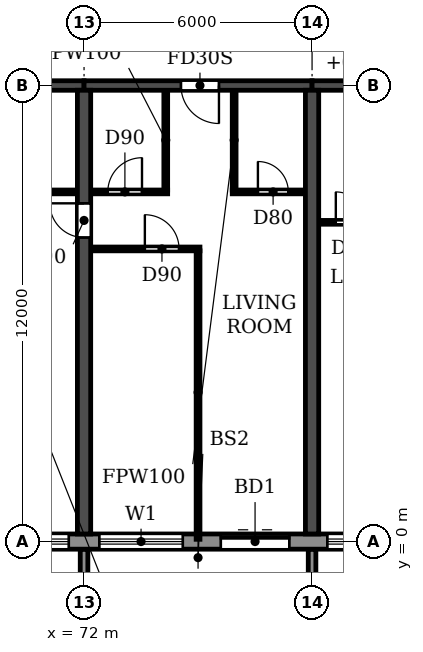
"""IFC4 building model, lengths in metres.
Left out: names, types, materials, properties, quantities, classifications, styles, units other than length and angle.
Written with IfcOpenShell. Run it as: python <this file> out.ifc"""

import sys

from ifc_helpers import new_model, si_unit, direction, frame, frame_2d, origin, place, context, subcontext, project, spatial, polyline, rectangle, outline, extrude, source, transform, mapped, element, fill, save


model = new_model("IFC4")
c1 = context("Model", 3, precision=1e-05, world=origin(), true_north=direction((0.0, 1.0)))
c2 = subcontext(c1, "Body", "Model", "MODEL_VIEW")
j1 = project(units=[si_unit("LENGTHUNIT", "METRE"), si_unit("PLANEANGLEUNIT", "RADIAN")], contexts=[c1])
p1 = place(None, origin())
s1 = spatial("IfcSite", under=j1, at=p1, CompositionType="ELEMENT")
p2 = place(p1, origin())
s2 = spatial("IfcBuilding", under=s1, at=p2, CompositionType="ELEMENT")
p3 = place(p2, frame((0.0, 0.0, 82.8)))
s3 = spatial("IfcBuildingStorey", under=s2, at=p3, CompositionType="ELEMENT", Elevation=82.8)
p4 = place(p3, frame((72.0, 0.2, 0.0), z_axis=(0.0, 0.0, 1.0), x_axis=(0.0, 1.0, 0.0)))
e1 = element("IfcWall", 1, at=p4, inside=s3, PredefinedType="SHEAR", context=c2, shape_type="SweptSolid", body=[
    extrude(rectangle(XDim=11.675, YDim=0.35, at=frame_2d((5.837, 0.0))), origin(), (0.0, 0.0, 1.0), 3.06),
])
p5 = place(p4, frame((7.8, 0.0, 0.0)))
e2 = element("IfcOpeningElement", 2, at=p5, cuts=e1, PredefinedType="OPENING", context=c2, shape_type="SweptSolid", body=[
    extrude(rectangle(XDim=0.9, YDim=2.1, at=frame_2d((0.45, 1.05))), frame((0.0, 0.185, 0.0), z_axis=(0.0, -1.0, 0.0), x_axis=(1.0, 0.0, 0.0)), (0.0, 0.0, 1.0), 0.37),
])
p6 = place(p3, frame((78.0, 0.2, 0.0), z_axis=(0.0, 0.0, 1.0), x_axis=(0.0, 1.0, 0.0)))
e3 = element("IfcWall", 3, at=p6, inside=s3, PredefinedType="SHEAR", context=c2, shape_type="SweptSolid", body=[
    extrude(rectangle(XDim=11.675, YDim=0.35, at=frame_2d((5.837, 0.0))), origin(), (0.0, 0.0, 1.0), 3.06),
])
p7 = place(p3, frame((66.0, 12.0, 0.0), z_axis=(0.0, 0.0, 1.0), x_axis=(1.0, 0.0, 0.0)))
e4 = element("IfcWall", 4, at=p7, inside=s3, PredefinedType="SHEAR", context=c2, shape_type="SweptSolid", body=[
    extrude(rectangle(XDim=6.0, YDim=0.25, at=frame_2d((3.0, 0.0))), origin(), (0.0, 0.0, 1.0), 2.46),
])
p8 = place(p3, frame((72.0, 12.0, 0.0), z_axis=(0.0, 0.0, 1.0), x_axis=(1.0, 0.0, 0.0)))
e5 = element("IfcWall", 5, at=p8, inside=s3, PredefinedType="SHEAR", context=c2, shape_type="SweptSolid", body=[
    extrude(rectangle(XDim=6.0, YDim=0.25, at=frame_2d((3.0, 0.0))), origin(), (0.0, 0.0, 1.0), 2.46),
])
p9 = place(p8, frame((2.55, 0.0, 0.0)))
e6 = element("IfcOpeningElement", 6, at=p9, cuts=e5, PredefinedType="OPENING", context=c2, shape_type="SweptSolid", body=[
    extrude(rectangle(XDim=1.0, YDim=2.1, at=frame_2d((0.5, 1.05))), frame((0.0, 0.135, 0.0), z_axis=(0.0, -1.0, 0.0), x_axis=(1.0, 0.0, 0.0)), (0.0, 0.0, 1.0), 0.27),
])
p10 = place(p3, frame((78.0, 12.0, 0.0), z_axis=(0.0, 0.0, 1.0), x_axis=(1.0, 0.0, 0.0)))
e7 = element("IfcWall", 7, at=p10, inside=s3, PredefinedType="SHEAR", context=c2, shape_type="SweptSolid", body=[
    extrude(rectangle(XDim=6.0, YDim=0.25, at=frame_2d((3.0, 0.0))), origin(), (0.0, 0.0, 1.0), 2.46),
])
p11 = place(p10, frame((2.45, 0.0, 0.0)))
e8 = element("IfcOpeningElement", 8, at=p11, cuts=e7, PredefinedType="OPENING", context=c2, shape_type="SweptSolid", body=[
    extrude(rectangle(XDim=1.0, YDim=2.1, at=frame_2d((0.5, 1.05))), frame((0.0, 0.135, 0.0), z_axis=(0.0, -1.0, 0.0), x_axis=(1.0, 0.0, 0.0)), (0.0, 0.0, 1.0), 0.27),
])
p12 = place(p3, frame((10.683, 0.0, 0.0), z_axis=(0.0, 0.0, 1.0), x_axis=(1.0, 0.0, 0.0)))
e9 = element("IfcWall", 9, at=p12, inside=s3, PredefinedType="STANDARD", context=c2, shape_type="SweptSolid", body=[
    extrude(rectangle(XDim=80.634, YDim=0.4, at=frame_2d((40.317, 0.0))), origin(), (0.0, 0.0, 1.0), 3.06),
])
p13 = place(p12, frame((1.717, 0.0, 0.9)))
e10 = element("IfcOpeningElement", 10, at=p13, cuts=e9, PredefinedType="OPENING", context=c2, shape_type="SweptSolid", body=[
    extrude(rectangle(XDim=2.2, YDim=1.5, at=frame_2d((1.1, 0.75))), frame((0.0, 0.21, 0.0), z_axis=(0.0, -1.0, 0.0), x_axis=(1.0, 0.0, 0.0)), (0.0, 0.0, 1.0), 0.42),
])
p14 = place(p12, frame((4.917, 0.0, 0.0)))
e11 = element("IfcOpeningElement", 11, at=p14, cuts=e9, PredefinedType="OPENING", context=c2, shape_type="SweptSolid", body=[
    extrude(rectangle(XDim=1.8, YDim=2.4, at=frame_2d((0.9, 1.2))), frame((0.0, 0.21, 0.0), z_axis=(0.0, -1.0, 0.0), x_axis=(1.0, 0.0, 0.0)), (0.0, 0.0, 1.0), 0.42),
])
p15 = place(p12, frame((7.717, 0.0, 0.9)))
e12 = element("IfcOpeningElement", 12, at=p15, cuts=e9, PredefinedType="OPENING", context=c2, shape_type="SweptSolid", body=[
    extrude(rectangle(XDim=2.2, YDim=1.5, at=frame_2d((1.1, 0.75))), frame((0.0, 0.21, 0.0), z_axis=(0.0, -1.0, 0.0), x_axis=(1.0, 0.0, 0.0)), (0.0, 0.0, 1.0), 0.42),
])
p16 = place(p12, frame((10.717, 0.0, 0.9)))
e13 = element("IfcOpeningElement", 13, at=p16, cuts=e9, PredefinedType="OPENING", context=c2, shape_type="SweptSolid", body=[
    extrude(rectangle(XDim=2.2, YDim=1.5, at=frame_2d((1.1, 0.75))), frame((0.0, 0.21, 0.0), z_axis=(0.0, -1.0, 0.0), x_axis=(1.0, 0.0, 0.0)), (0.0, 0.0, 1.0), 0.42),
])
p17 = place(p12, frame((13.917, 0.0, 0.0)))
e14 = element("IfcOpeningElement", 14, at=p17, cuts=e9, PredefinedType="OPENING", context=c2, shape_type="SweptSolid", body=[
    extrude(rectangle(XDim=1.8, YDim=2.4, at=frame_2d((0.9, 1.2))), frame((0.0, 0.21, 0.0), z_axis=(0.0, -1.0, 0.0), x_axis=(1.0, 0.0, 0.0)), (0.0, 0.0, 1.0), 0.42),
])
p18 = place(p12, frame((16.717, 0.0, 0.9)))
e15 = element("IfcOpeningElement", 15, at=p18, cuts=e9, PredefinedType="OPENING", context=c2, shape_type="SweptSolid", body=[
    extrude(rectangle(XDim=2.2, YDim=1.5, at=frame_2d((1.1, 0.75))), frame((0.0, 0.21, 0.0), z_axis=(0.0, -1.0, 0.0), x_axis=(1.0, 0.0, 0.0)), (0.0, 0.0, 1.0), 0.42),
])
p19 = place(p12, frame((19.717, 0.0, 0.9)))
e16 = element("IfcOpeningElement", 16, at=p19, cuts=e9, PredefinedType="OPENING", context=c2, shape_type="SweptSolid", body=[
    extrude(rectangle(XDim=2.2, YDim=1.5, at=frame_2d((1.1, 0.75))), frame((0.0, 0.21, 0.0), z_axis=(0.0, -1.0, 0.0), x_axis=(1.0, 0.0, 0.0)), (0.0, 0.0, 1.0), 0.42),
])
p20 = place(p12, frame((22.717, 0.0, 0.9)))
e17 = element("IfcOpeningElement", 17, at=p20, cuts=e9, PredefinedType="OPENING", context=c2, shape_type="SweptSolid", body=[
    extrude(rectangle(XDim=2.2, YDim=1.5, at=frame_2d((1.1, 0.75))), frame((0.0, 0.21, 0.0), z_axis=(0.0, -1.0, 0.0), x_axis=(1.0, 0.0, 0.0)), (0.0, 0.0, 1.0), 0.42),
])
p21 = place(p12, frame((25.917, 0.0, 0.0)))
e18 = element("IfcOpeningElement", 18, at=p21, cuts=e9, PredefinedType="OPENING", context=c2, shape_type="SweptSolid", body=[
    extrude(rectangle(XDim=1.8, YDim=2.4, at=frame_2d((0.9, 1.2))), frame((0.0, 0.21, 0.0), z_axis=(0.0, -1.0, 0.0), x_axis=(1.0, 0.0, 0.0)), (0.0, 0.0, 1.0), 0.42),
])
p22 = place(p12, frame((28.717, 0.0, 0.9)))
e19 = element("IfcOpeningElement", 19, at=p22, cuts=e9, PredefinedType="OPENING", context=c2, shape_type="SweptSolid", body=[
    extrude(rectangle(XDim=2.2, YDim=1.5, at=frame_2d((1.1, 0.75))), frame((0.0, 0.21, 0.0), z_axis=(0.0, -1.0, 0.0), x_axis=(1.0, 0.0, 0.0)), (0.0, 0.0, 1.0), 0.42),
])
p23 = place(p12, frame((31.717, 0.0, 0.9)))
e20 = element("IfcOpeningElement", 20, at=p23, cuts=e9, PredefinedType="OPENING", context=c2, shape_type="SweptSolid", body=[
    extrude(rectangle(XDim=2.2, YDim=1.5, at=frame_2d((1.1, 0.75))), frame((0.0, 0.21, 0.0), z_axis=(0.0, -1.0, 0.0), x_axis=(1.0, 0.0, 0.0)), (0.0, 0.0, 1.0), 0.42),
])
p24 = place(p12, frame((34.717, 0.0, 0.9)))
e21 = element("IfcOpeningElement", 21, at=p24, cuts=e9, PredefinedType="OPENING", context=c2, shape_type="SweptSolid", body=[
    extrude(rectangle(XDim=2.2, YDim=1.5, at=frame_2d((1.1, 0.75))), frame((0.0, 0.21, 0.0), z_axis=(0.0, -1.0, 0.0), x_axis=(1.0, 0.0, 0.0)), (0.0, 0.0, 1.0), 0.42),
])
p25 = place(p12, frame((37.717, 0.0, 0.9)))
e22 = element("IfcOpeningElement", 22, at=p25, cuts=e9, PredefinedType="OPENING", context=c2, shape_type="SweptSolid", body=[
    extrude(rectangle(XDim=2.2, YDim=1.5, at=frame_2d((1.1, 0.75))), frame((0.0, 0.21, 0.0), z_axis=(0.0, -1.0, 0.0), x_axis=(1.0, 0.0, 0.0)), (0.0, 0.0, 1.0), 0.42),
])
p26 = place(p12, frame((40.917, 0.0, 0.0)))
e23 = element("IfcOpeningElement", 23, at=p26, cuts=e9, PredefinedType="OPENING", context=c2, shape_type="SweptSolid", body=[
    extrude(rectangle(XDim=1.8, YDim=2.4, at=frame_2d((0.9, 1.2))), frame((0.0, 0.21, 0.0), z_axis=(0.0, -1.0, 0.0), x_axis=(1.0, 0.0, 0.0)), (0.0, 0.0, 1.0), 0.42),
])
p27 = place(p12, frame((43.717, 0.0, 0.9)))
e24 = element("IfcOpeningElement", 24, at=p27, cuts=e9, PredefinedType="OPENING", context=c2, shape_type="SweptSolid", body=[
    extrude(rectangle(XDim=2.2, YDim=1.5, at=frame_2d((1.1, 0.75))), frame((0.0, 0.21, 0.0), z_axis=(0.0, -1.0, 0.0), x_axis=(1.0, 0.0, 0.0)), (0.0, 0.0, 1.0), 0.42),
])
p28 = place(p12, frame((46.717, 0.0, 0.9)))
e25 = element("IfcOpeningElement", 25, at=p28, cuts=e9, PredefinedType="OPENING", context=c2, shape_type="SweptSolid", body=[
    extrude(rectangle(XDim=2.2, YDim=1.5, at=frame_2d((1.1, 0.75))), frame((0.0, 0.21, 0.0), z_axis=(0.0, -1.0, 0.0), x_axis=(1.0, 0.0, 0.0)), (0.0, 0.0, 1.0), 0.42),
])
p29 = place(p12, frame((49.717, 0.0, 0.9)))
e26 = element("IfcOpeningElement", 26, at=p29, cuts=e9, PredefinedType="OPENING", context=c2, shape_type="SweptSolid", body=[
    extrude(rectangle(XDim=2.2, YDim=1.5, at=frame_2d((1.1, 0.75))), frame((0.0, 0.21, 0.0), z_axis=(0.0, -1.0, 0.0), x_axis=(1.0, 0.0, 0.0)), (0.0, 0.0, 1.0), 0.42),
])
p30 = place(p12, frame((52.917, 0.0, 0.0)))
e27 = element("IfcOpeningElement", 27, at=p30, cuts=e9, PredefinedType="OPENING", context=c2, shape_type="SweptSolid", body=[
    extrude(rectangle(XDim=1.8, YDim=2.4, at=frame_2d((0.9, 1.2))), frame((0.0, 0.21, 0.0), z_axis=(0.0, -1.0, 0.0), x_axis=(1.0, 0.0, 0.0)), (0.0, 0.0, 1.0), 0.42),
])
p31 = place(p12, frame((55.717, 0.0, 0.9)))
e28 = element("IfcOpeningElement", 28, at=p31, cuts=e9, PredefinedType="OPENING", context=c2, shape_type="SweptSolid", body=[
    extrude(rectangle(XDim=2.2, YDim=1.5, at=frame_2d((1.1, 0.75))), frame((0.0, 0.21, 0.0), z_axis=(0.0, -1.0, 0.0), x_axis=(1.0, 0.0, 0.0)), (0.0, 0.0, 1.0), 0.42),
])
p32 = place(p12, frame((58.717, 0.0, 0.9)))
e29 = element("IfcOpeningElement", 29, at=p32, cuts=e9, PredefinedType="OPENING", context=c2, shape_type="SweptSolid", body=[
    extrude(rectangle(XDim=2.2, YDim=1.5, at=frame_2d((1.1, 0.75))), frame((0.0, 0.21, 0.0), z_axis=(0.0, -1.0, 0.0), x_axis=(1.0, 0.0, 0.0)), (0.0, 0.0, 1.0), 0.42),
])
p33 = place(p12, frame((61.717, 0.0, 0.9)))
e30 = element("IfcOpeningElement", 30, at=p33, cuts=e9, PredefinedType="OPENING", context=c2, shape_type="SweptSolid", body=[
    extrude(rectangle(XDim=2.2, YDim=1.5, at=frame_2d((1.1, 0.75))), frame((0.0, 0.21, 0.0), z_axis=(0.0, -1.0, 0.0), x_axis=(1.0, 0.0, 0.0)), (0.0, 0.0, 1.0), 0.42),
])
p34 = place(p12, frame((64.917, 0.0, 0.0)))
e31 = element("IfcOpeningElement", 31, at=p34, cuts=e9, PredefinedType="OPENING", context=c2, shape_type="SweptSolid", body=[
    extrude(rectangle(XDim=1.8, YDim=2.4, at=frame_2d((0.9, 1.2))), frame((0.0, 0.21, 0.0), z_axis=(0.0, -1.0, 0.0), x_axis=(1.0, 0.0, 0.0)), (0.0, 0.0, 1.0), 0.42),
])
p35 = place(p12, frame((67.717, 0.0, 0.9)))
e32 = element("IfcOpeningElement", 32, at=p35, cuts=e9, PredefinedType="OPENING", context=c2, shape_type="SweptSolid", body=[
    extrude(rectangle(XDim=2.2, YDim=1.5, at=frame_2d((1.1, 0.75))), frame((0.0, 0.21, 0.0), z_axis=(0.0, -1.0, 0.0), x_axis=(1.0, 0.0, 0.0)), (0.0, 0.0, 1.0), 0.42),
])
p36 = place(p12, frame((70.717, 0.0, 0.9)))
e33 = element("IfcOpeningElement", 33, at=p36, cuts=e9, PredefinedType="OPENING", context=c2, shape_type="SweptSolid", body=[
    extrude(rectangle(XDim=2.2, YDim=1.5, at=frame_2d((1.1, 0.75))), frame((0.0, 0.21, 0.0), z_axis=(0.0, -1.0, 0.0), x_axis=(1.0, 0.0, 0.0)), (0.0, 0.0, 1.0), 0.42),
])
p37 = place(p12, frame((73.917, 0.0, 0.0)))
e34 = element("IfcOpeningElement", 34, at=p37, cuts=e9, PredefinedType="OPENING", context=c2, shape_type="SweptSolid", body=[
    extrude(rectangle(XDim=1.8, YDim=2.4, at=frame_2d((0.9, 1.2))), frame((0.0, 0.21, 0.0), z_axis=(0.0, -1.0, 0.0), x_axis=(1.0, 0.0, 0.0)), (0.0, 0.0, 1.0), 0.42),
])
p38 = place(p12, frame((76.717, 0.0, 0.9)))
e35 = element("IfcOpeningElement", 35, at=p38, cuts=e9, PredefinedType="OPENING", context=c2, shape_type="SweptSolid", body=[
    extrude(rectangle(XDim=2.2, YDim=1.5, at=frame_2d((1.1, 0.75))), frame((0.0, 0.21, 0.0), z_axis=(0.0, -1.0, 0.0), x_axis=(1.0, 0.0, 0.0)), (0.0, 0.0, 1.0), 0.42),
])
m1 = source(origin(), c2, "Body", "SweptSolid", [
    extrude(outline(polyline([(0.0, 0.0), (0.2, 0.0), (0.2, 1.65), (0.0, 1.65), (0.0, 0.0)])), origin(), (0.0, 0.0, 1.0), 3.1),
])
for number, where in (
    (36, (71.9, -1.85, 0.0)),
    (37, (77.9, -1.85, 0.0)),
):
    element("IfcWall", number, at=place(p3, frame(where)), inside=s3, PredefinedType="STANDARD", context=c2, shape_type="MappedRepresentation", body=[
        mapped(m1, transform((0.0, 0.0, 0.0))),
    ])
p39 = place(p3, frame((72.185, 7.7, 0.0), z_axis=(0.0, 0.0, 1.0), x_axis=(1.0, 0.0, 0.0)))
e38 = element("IfcWall", 38, at=p39, inside=s3, PredefinedType="PARTITIONING", context=c2, shape_type="SweptSolid", body=[
    extrude(rectangle(XDim=2.865, YDim=0.1, at=frame_2d((1.433, 0.0))), origin(), (0.0, 0.0, 1.0), 3.06),
])
p40 = place(p39, frame((1.415, 0.0, 0.0)))
e39 = element("IfcOpeningElement", 39, at=p40, cuts=e38, PredefinedType="OPENING", context=c2, shape_type="SweptSolid", body=[
    extrude(rectangle(XDim=0.9, YDim=2.1, at=frame_2d((0.45, 1.05))), frame((0.0, 0.06, 0.0), z_axis=(0.0, -1.0, 0.0), x_axis=(1.0, 0.0, 0.0)), (0.0, 0.0, 1.0), 0.12),
])
p41 = place(p3, frame((78.185, 8.4, 0.0), z_axis=(0.0, 0.0, 1.0), x_axis=(1.0, 0.0, 0.0)))
e40 = element("IfcWall", 40, at=p41, inside=s3, PredefinedType="PARTITIONING", context=c2, shape_type="SweptSolid", body=[
    extrude(rectangle(XDim=1.915, YDim=0.1, at=frame_2d((0.958, 0.0))), origin(), (0.0, 0.0, 1.0), 3.06),
])
p42 = place(p41, frame((0.44, 0.0, 0.0)))
e41 = element("IfcOpeningElement", 41, at=p42, cuts=e40, PredefinedType="OPENING", context=c2, shape_type="SweptSolid", body=[
    extrude(rectangle(XDim=0.8, YDim=2.1, at=frame_2d((0.4, 1.05))), frame((0.0, 0.06, 0.0), z_axis=(0.0, -1.0, 0.0), x_axis=(1.0, 0.0, 0.0)), (0.0, 0.0, 1.0), 0.12),
])
p43 = place(p3, frame((68.9, 9.2, 0.0), z_axis=(0.0, 0.0, 1.0), x_axis=(1.0, 0.0, 0.0)))
e42 = element("IfcWall", 42, at=p43, inside=s3, PredefinedType="PARTITIONING", context=c2, shape_type="SweptSolid", body=[
    extrude(rectangle(XDim=2.915, YDim=0.1, at=frame_2d((1.458, 0.0))), origin(), (0.0, 0.0, 1.0), 3.06),
])
p44 = place(p43, frame((1.2, 0.0, 0.0)))
e43 = element("IfcOpeningElement", 43, at=p44, cuts=e42, PredefinedType="OPENING", context=c2, shape_type="SweptSolid", body=[
    extrude(rectangle(XDim=0.8, YDim=2.1, at=frame_2d((0.4, 1.05))), frame((0.0, 0.06, 0.0), z_axis=(0.0, -1.0, 0.0), x_axis=(1.0, 0.0, 0.0)), (0.0, 0.0, 1.0), 0.12),
])
p45 = place(p3, frame((72.185, 9.2, 0.0), z_axis=(0.0, 0.0, 1.0), x_axis=(1.0, 0.0, 0.0)))
e44 = element("IfcWall", 44, at=p45, inside=s3, PredefinedType="PARTITIONING", context=c2, shape_type="SweptSolid", body=[
    extrude(rectangle(XDim=2.015, YDim=0.1, at=frame_2d((1.007, 0.0))), origin(), (0.0, 0.0, 1.0), 3.06),
])
p46 = place(p45, frame((0.44, 0.0, 0.0)))
e45 = element("IfcOpeningElement", 45, at=p46, cuts=e44, PredefinedType="OPENING", context=c2, shape_type="SweptSolid", body=[
    extrude(rectangle(XDim=0.9, YDim=2.1, at=frame_2d((0.45, 1.05))), frame((0.0, 0.06, 0.0), z_axis=(0.0, -1.0, 0.0), x_axis=(1.0, 0.0, 0.0)), (0.0, 0.0, 1.0), 0.12),
])
p47 = place(p3, frame((75.9, 9.2, 0.0), z_axis=(0.0, 0.0, 1.0), x_axis=(1.0, 0.0, 0.0)))
e46 = element("IfcWall", 46, at=p47, inside=s3, PredefinedType="PARTITIONING", context=c2, shape_type="SweptSolid", body=[
    extrude(rectangle(XDim=1.915, YDim=0.1, at=frame_2d((0.958, 0.0))), origin(), (0.0, 0.0, 1.0), 3.06),
])
p48 = place(p47, frame((0.675, 0.0, 0.0)))
e47 = element("IfcOpeningElement", 47, at=p48, cuts=e46, PredefinedType="OPENING", context=c2, shape_type="SweptSolid", body=[
    extrude(rectangle(XDim=0.8, YDim=2.1, at=frame_2d((0.4, 1.05))), frame((0.0, 0.06, 0.0), z_axis=(0.0, -1.0, 0.0), x_axis=(1.0, 0.0, 0.0)), (0.0, 0.0, 1.0), 0.12),
])
p49 = place(p3, frame((74.15, 9.25, 0.0), z_axis=(0.0, 0.0, 1.0), x_axis=(0.0, 1.0, 0.0)))
e48 = element("IfcWall", 48, at=p49, inside=s3, PredefinedType="PARTITIONING", context=c2, shape_type="SweptSolid", body=[
    extrude(rectangle(XDim=2.615, YDim=0.1, at=frame_2d((1.308, 0.0))), origin(), (0.0, 0.0, 1.0), 3.06),
])
p50 = place(p3, frame((75.0, 0.06, 0.0), z_axis=(0.0, 0.0, 1.0), x_axis=(0.0, 1.0, 0.0)))
e49 = element("IfcWall", 49, at=p50, inside=s3, PredefinedType="PARTITIONING", context=c2, shape_type="SweptSolid", body=[
    extrude(rectangle(XDim=7.59, YDim=0.1, at=frame_2d((3.795, 0.0))), origin(), (0.0, 0.0, 1.0), 3.06),
])
p51 = place(p3, frame((75.95, 9.25, 0.0), z_axis=(0.0, 0.0, 1.0), x_axis=(0.0, 1.0, 0.0)))
e50 = element("IfcWall", 50, at=p51, inside=s3, PredefinedType="PARTITIONING", context=c2, shape_type="SweptSolid", body=[
    extrude(rectangle(XDim=2.615, YDim=0.1, at=frame_2d((1.308, 0.0))), origin(), (0.0, 0.0, 1.0), 3.06),
])
p52 = place(p32, origin())
e51 = element("IfcWindow", 51, at=p52, inside=s3, PartitioningType="DOUBLE_PANEL_HORIZONTAL", PredefinedType="WINDOW", context=c2, shape_type="SweptSolid", body=[
    extrude(rectangle(XDim=2.2, YDim=1.5, at=frame_2d((1.1, 0.75))), frame((0.0, 0.03, 0.0), z_axis=(0.0, -1.0, 0.0), x_axis=(1.0, 0.0, 0.0)), (0.0, 0.0, 1.0), 0.06),
])
fill(e29, e51)
p53 = place(p33, origin())
e52 = element("IfcWindow", 52, at=p53, inside=s3, PartitioningType="DOUBLE_PANEL_HORIZONTAL", PredefinedType="WINDOW", context=c2, shape_type="SweptSolid", body=[
    extrude(rectangle(XDim=2.2, YDim=1.5, at=frame_2d((1.1, 0.75))), frame((0.0, 0.03, 0.0), z_axis=(0.0, -1.0, 0.0), x_axis=(1.0, 0.0, 0.0)), (0.0, 0.0, 1.0), 0.06),
])
fill(e30, e52)
p54 = place(p34, origin())
e53 = element("IfcDoor", 53, at=p54, inside=s3, OperationType="DOUBLE_DOOR_SLIDING", PredefinedType="DOOR", context=c2, shape_type="SweptSolid", body=[
    extrude(rectangle(XDim=1.8, YDim=2.4, at=frame_2d((0.9, 1.2))), frame((0.0, 0.025, 0.0), z_axis=(0.0, -1.0, 0.0), x_axis=(1.0, 0.0, 0.0)), (0.0, 0.0, 1.0), 0.05),
])
fill(e31, e53)
p55 = place(p35, origin())
e54 = element("IfcWindow", 54, at=p55, inside=s3, PartitioningType="DOUBLE_PANEL_HORIZONTAL", PredefinedType="WINDOW", context=c2, shape_type="SweptSolid", body=[
    extrude(rectangle(XDim=2.2, YDim=1.5, at=frame_2d((1.1, 0.75))), frame((0.0, 0.03, 0.0), z_axis=(0.0, -1.0, 0.0), x_axis=(1.0, 0.0, 0.0)), (0.0, 0.0, 1.0), 0.06),
])
fill(e32, e54)
p56 = place(p5, origin())
e55 = element("IfcDoor", 55, at=p56, inside=s3, OperationType="SINGLE_SWING_RIGHT", PredefinedType="DOOR", context=c2, shape_type="SweptSolid", body=[
    extrude(rectangle(XDim=0.9, YDim=2.1, at=frame_2d((0.45, 1.05))), frame((0.0, 0.025, 0.0), z_axis=(0.0, -1.0, 0.0), x_axis=(1.0, 0.0, 0.0)), (0.0, 0.0, 1.0), 0.05),
])
fill(e2, e55)
p57 = place(p46, origin())
e56 = element("IfcDoor", 56, at=p57, inside=s3, OperationType="SINGLE_SWING_RIGHT", PredefinedType="DOOR", context=c2, shape_type="SweptSolid", body=[
    extrude(rectangle(XDim=0.9, YDim=2.1, at=frame_2d((0.45, 1.05))), frame((0.0, 0.025, 0.0), z_axis=(0.0, -1.0, 0.0), x_axis=(1.0, 0.0, 0.0)), (0.0, 0.0, 1.0), 0.05),
])
fill(e45, e56)
p58 = place(p40, origin())
e57 = element("IfcDoor", 57, at=p58, inside=s3, OperationType="SINGLE_SWING_LEFT", PredefinedType="DOOR", context=c2, shape_type="SweptSolid", body=[
    extrude(rectangle(XDim=0.9, YDim=2.1, at=frame_2d((0.45, 1.05))), frame((0.0, 0.025, 0.0), z_axis=(0.0, -1.0, 0.0), x_axis=(1.0, 0.0, 0.0)), (0.0, 0.0, 1.0), 0.05),
])
fill(e39, e57)
p59 = place(p9, frame((1.0, 0.0, 0.0), z_axis=(0.0, 0.0, 1.0), x_axis=(-1.0, 0.0, 0.0)))
e58 = element("IfcDoor", 58, at=p59, inside=s3, OperationType="SINGLE_SWING_LEFT", PredefinedType="DOOR", context=c2, shape_type="SweptSolid", body=[
    extrude(rectangle(XDim=1.0, YDim=2.1, at=frame_2d((0.5, 1.05))), frame((0.0, 0.025, 0.0), z_axis=(0.0, -1.0, 0.0), x_axis=(1.0, 0.0, 0.0)), (0.0, 0.0, 1.0), 0.05),
])
fill(e6, e58)
p60 = place(p48, origin())
e59 = element("IfcDoor", 59, at=p60, inside=s3, OperationType="SINGLE_SWING_LEFT", PredefinedType="DOOR", context=c2, shape_type="SweptSolid", body=[
    extrude(rectangle(XDim=0.8, YDim=2.1, at=frame_2d((0.4, 1.05))), frame((0.0, 0.025, 0.0), z_axis=(0.0, -1.0, 0.0), x_axis=(1.0, 0.0, 0.0)), (0.0, 0.0, 1.0), 0.05),
])
fill(e47, e59)
p61 = place(p42, origin())
e60 = element("IfcDoor", 60, at=p61, inside=s3, OperationType="SINGLE_SWING_LEFT", PredefinedType="DOOR", context=c2, shape_type="SweptSolid", body=[
    extrude(rectangle(XDim=0.8, YDim=2.1, at=frame_2d((0.4, 1.05))), frame((0.0, 0.025, 0.0), z_axis=(0.0, -1.0, 0.0), x_axis=(1.0, 0.0, 0.0)), (0.0, 0.0, 1.0), 0.05),
])
fill(e41, e60)
save(model, sys.argv[1])
